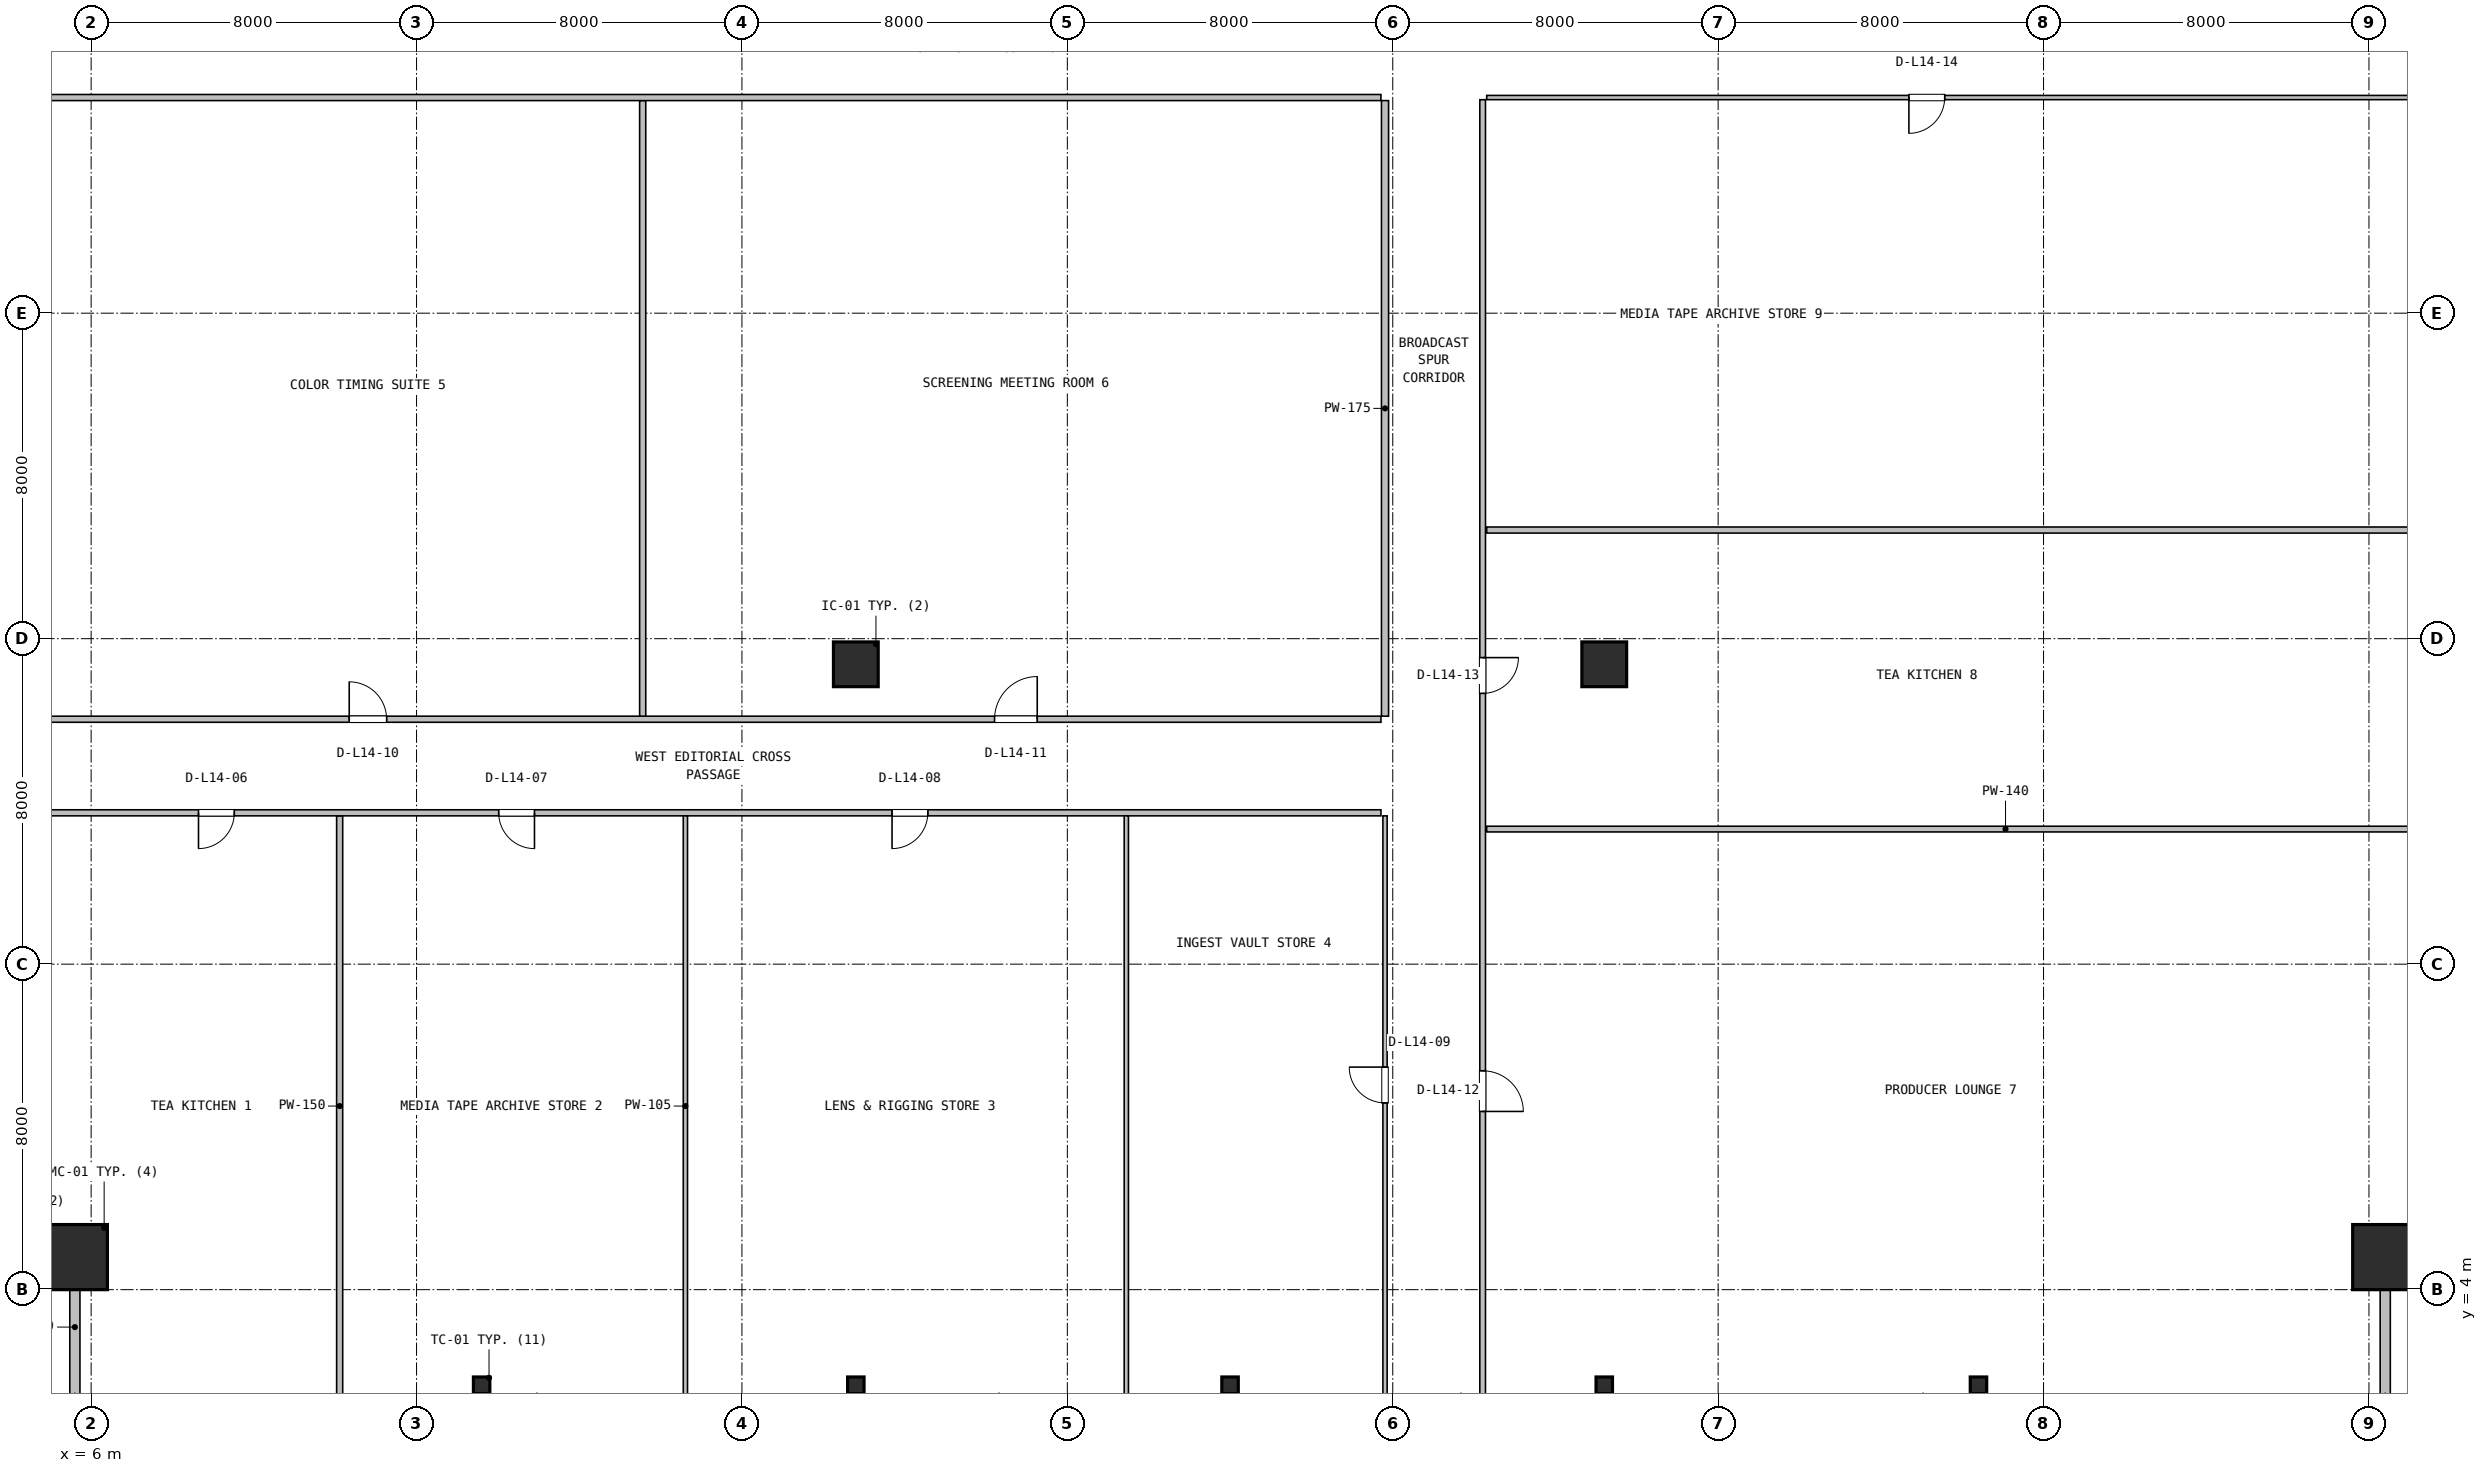
"""IFC4 building model, lengths in metres.
Left out: names, types, materials, properties, quantities, classifications, styles, units other than length and angle.
Written with IfcOpenShell. Run it as: python <this file> out.ifc"""

import sys

from ifc_helpers import new_model, si_unit, direction, frame, frame_2d, origin, origin_2d, place, context, subcontext, project, spatial, rectangle, hollow_rectangle, i_section, extrude, source, transform, mapped, element, fill, save


model = new_model("IFC4")
c1 = context("Model", 3, precision=1e-05, world=origin(), true_north=direction((0.0, 1.0)))
c2 = subcontext(c1, "Body", "Model", "MODEL_VIEW")
j1 = project(units=[si_unit("LENGTHUNIT", "METRE"), si_unit("PLANEANGLEUNIT", "RADIAN")], contexts=[c1])
p1 = place(None, origin())
s1 = spatial("IfcSite", under=j1, at=p1, CompositionType="ELEMENT")
p2 = place(p1, origin())
s2 = spatial("IfcBuilding", under=s1, at=p2, CompositionType="ELEMENT")
p3 = place(p2, frame((0.0, 0.0, 62.7)))
s3 = spatial("IfcBuildingStorey", under=s2, at=p3, CompositionType="ELEMENT", Elevation=62.7)
m1 = source(origin(), c2, "Body", "SweptSolid", [
    extrude(hollow_rectangle(XDim=1.6, YDim=1.6, WallThickness=0.06, at=origin_2d()), origin(), (0.0, 0.0, 1.0), 3.9),
])
for number, where, z_axis, x_axis in (
    (1, (5.6, 4.8, 0.0), (0.0, 0.0, 1.0), (1.0, 0.0, 0.0)),
    (2, (62.4, 4.8, 0.0), (0.0, 0.0, 1.0), (1.0, 0.0, 0.0)),
):
    element("IfcColumn", number, at=place(p3, frame(where, z_axis=z_axis, x_axis=x_axis)), inside=s3, PredefinedType="COLUMN", context=c2, shape_type="MappedRepresentation", body=[
        mapped(m1, transform((0.0, 0.0, 0.0), x_axis=(1.0, 0.0, 0.0), y_axis=(0.0, 1.0, 0.0), z_axis=(0.0, 0.0, 1.0), scale=1.0)),
    ])
m2 = source(origin(), c2, "Body", "SweptSolid", [
    extrude(i_section(OverallWidth=0.404, OverallDepth=0.407, WebThickness=0.027, FlangeThickness=0.044, FilletRadius=0.018, at=origin_2d()), origin(), (0.0, 0.0, 1.0), 3.9),
])
for number, where, z_axis, x_axis in (
    (3, (15.6, 1.65, 0.0), (0.0, 0.0, 1.0), (1.0, 0.0, 0.0)),
    (4, (24.8, 1.65, 0.0), (0.0, 0.0, 1.0), (1.0, 0.0, 0.0)),
    (5, (34.0, 1.65, 0.0), (0.0, 0.0, 1.0), (1.0, 0.0, 0.0)),
    (6, (43.2, 1.65, 0.0), (0.0, 0.0, 1.0), (1.0, 0.0, 0.0)),
    (7, (52.4, 1.65, 0.0), (0.0, 0.0, 1.0), (1.0, 0.0, 0.0)),
):
    element("IfcColumn", number, at=place(p3, frame(where, z_axis=z_axis, x_axis=x_axis)), inside=s3, PredefinedType="COLUMN", context=c2, shape_type="MappedRepresentation", body=[
        mapped(m2, transform((0.0, 0.0, 0.0), x_axis=(1.0, 0.0, 0.0), y_axis=(0.0, 1.0, 0.0), z_axis=(0.0, 0.0, 1.0), scale=1.0)),
    ])
m3 = source(origin(), c2, "Body", "SweptSolid", [
    extrude(rectangle(XDim=1.1, YDim=1.1, at=origin_2d()), origin(), (0.0, 0.0, 1.0), 3.9),
])
for number, where, z_axis, x_axis in (
    (8, (24.8, 19.37, 0.0), (0.0, 0.0, 1.0), (1.0, 0.0, 0.0)),
    (9, (43.2, 19.37, 0.0), (0.0, 0.0, 1.0), (1.0, 0.0, 0.0)),
):
    element("IfcColumn", number, at=place(p3, frame(where, z_axis=z_axis, x_axis=x_axis)), inside=s3, PredefinedType="COLUMN", context=c2, shape_type="MappedRepresentation", body=[
        mapped(m3, transform((0.0, 0.0, 0.0), x_axis=(1.0, 0.0, 0.0), y_axis=(0.0, 1.0, 0.0), z_axis=(0.0, 0.0, 1.0), scale=1.0)),
    ])
for number, where, z_axis, x_axis in (
    (10, (5.6, 1.28, 0.0), (0.0, 0.0, 1.0), (0.0, 1.0, 0.0)),
    (11, (62.4, 1.28, 0.0), (0.0, 0.0, 1.0), (0.0, 1.0, 0.0)),
):
    element("IfcWall", number, at=place(p3, frame(where, z_axis=z_axis, x_axis=x_axis)), inside=s3, PredefinedType="SOLIDWALL", context=c2, shape_type="SweptSolid", body=[
        extrude(rectangle(XDim=3.6, YDim=0.25, at=frame_2d((1.8, 0.0))), origin(), (0.0, 0.0, 1.0), 3.208),
    ])
p4 = place(p3, frame((12.11, 1.38, 0.0), z_axis=(0.0, 0.0, 1.0), x_axis=(0.0, 1.0, 0.0)))
e12 = element("IfcWall", 12, at=p4, inside=s3, PredefinedType="PARTITIONING", context=c2, shape_type="SweptSolid", body=[
    extrude(rectangle(XDim=14.265, YDim=0.15, at=frame_2d((7.133, 0.0))), origin(), (0.0, 0.0, 1.0), 3.208),
])
p5 = place(p3, frame((2.18, 15.72, 0.0), z_axis=(0.0, 0.0, 1.0), x_axis=(1.0, 0.0, 0.0)))
e13 = element("IfcWall", 13, at=p5, inside=s3, PredefinedType="PARTITIONING", context=c2, shape_type="SweptSolid", body=[
    extrude(rectangle(XDim=35.53, YDim=0.15, at=frame_2d((17.765, 0.0))), origin(), (0.0, 0.0, 1.0), 2.852),
])
p6 = place(p5, frame((6.46, 0.0, 0.0)))
e14 = element("IfcOpeningElement", 14, at=p6, cuts=e13, PredefinedType="OPENING", context=c2, shape_type="SweptSolid", body=[
    extrude(rectangle(XDim=0.88, YDim=2.06, at=frame_2d((0.44, 1.03))), frame((0.0, 0.085, 0.0), z_axis=(0.0, -1.0, 0.0), x_axis=(1.0, 0.0, 0.0)), (0.0, 0.0, 1.0), 0.17),
])
p7 = place(p5, frame((13.84, 0.0, 0.0)))
e15 = element("IfcOpeningElement", 15, at=p7, cuts=e13, PredefinedType="OPENING", context=c2, shape_type="SweptSolid", body=[
    extrude(rectangle(XDim=0.88, YDim=2.06, at=frame_2d((0.44, 1.03))), frame((0.0, 0.085, 0.0), z_axis=(0.0, -1.0, 0.0), x_axis=(1.0, 0.0, 0.0)), (0.0, 0.0, 1.0), 0.17),
])
p8 = place(p5, frame((23.51, 0.0, 0.0)))
e16 = element("IfcOpeningElement", 16, at=p8, cuts=e13, PredefinedType="OPENING", context=c2, shape_type="SweptSolid", body=[
    extrude(rectangle(XDim=0.88, YDim=2.06, at=frame_2d((0.44, 1.03))), frame((0.0, 0.085, 0.0), z_axis=(0.0, -1.0, 0.0), x_axis=(1.0, 0.0, 0.0)), (0.0, 0.0, 1.0), 0.17),
])
for number, where, z_axis, x_axis in (
    (17, (20.61, 1.38, 0.0), (0.0, 0.0, 1.0), (0.0, 1.0, 0.0)),
    (18, (31.45, 1.38, 0.0), (0.0, 0.0, 1.0), (0.0, 1.0, 0.0)),
):
    element("IfcWall", number, at=place(p3, frame(where, z_axis=z_axis, x_axis=x_axis)), inside=s3, PredefinedType="PARTITIONING", context=c2, shape_type="SweptSolid", body=[
        extrude(rectangle(XDim=14.265, YDim=0.105, at=frame_2d((7.133, 0.0))), origin(), (0.0, 0.0, 1.0), 3.208),
    ])
p9 = place(p3, frame((37.81, 1.38, 0.0), z_axis=(0.0, 0.0, 1.0), x_axis=(0.0, 1.0, 0.0)))
e19 = element("IfcWall", 19, at=p9, inside=s3, PredefinedType="PARTITIONING", context=c2, shape_type="SweptSolid", body=[
    extrude(rectangle(XDim=14.265, YDim=0.105, at=frame_2d((7.133, 0.0))), origin(), (0.0, 0.0, 1.0), 3.208),
])
p10 = place(p9, frame((7.21, 0.0, 0.0)))
e20 = element("IfcOpeningElement", 20, at=p10, cuts=e19, PredefinedType="OPENING", context=c2, shape_type="SweptSolid", body=[
    extrude(rectangle(XDim=0.88, YDim=2.06, at=frame_2d((0.44, 1.03))), frame((0.0, 0.062, 0.0), z_axis=(0.0, -1.0, 0.0), x_axis=(1.0, 0.0, 0.0)), (0.0, 0.0, 1.0), 0.125),
])
p11 = place(p3, frame((2.18, 18.02, 0.0), z_axis=(0.0, 0.0, 1.0), x_axis=(1.0, 0.0, 0.0)))
e21 = element("IfcWall", 21, at=p11, inside=s3, PredefinedType="PARTITIONING", context=c2, shape_type="SweptSolid", body=[
    extrude(rectangle(XDim=35.53, YDim=0.15, at=frame_2d((17.765, 0.0))), origin(), (0.0, 0.0, 1.0), 2.852),
])
p12 = place(p11, frame((10.165, 0.0, 0.0)))
e22 = element("IfcOpeningElement", 22, at=p12, cuts=e21, PredefinedType="OPENING", context=c2, shape_type="SweptSolid", body=[
    extrude(rectangle(XDim=0.92, YDim=2.08, at=frame_2d((0.46, 1.04))), frame((0.0, 0.085, 0.0), z_axis=(0.0, -1.0, 0.0), x_axis=(1.0, 0.0, 0.0)), (0.0, 0.0, 1.0), 0.17),
])
p13 = place(p11, frame((26.03, 0.0, 0.0)))
e23 = element("IfcOpeningElement", 23, at=p13, cuts=e21, PredefinedType="OPENING", context=c2, shape_type="SweptSolid", body=[
    extrude(rectangle(XDim=1.05, YDim=2.1, at=frame_2d((0.525, 1.05))), frame((0.0, 0.085, 0.0), z_axis=(0.0, -1.0, 0.0), x_axis=(1.0, 0.0, 0.0)), (0.0, 0.0, 1.0), 0.17),
])
p14 = place(p3, frame((19.56, 18.095, 0.0), z_axis=(0.0, 0.0, 1.0), x_axis=(0.0, 1.0, 0.0)))
e24 = element("IfcWall", 24, at=p14, inside=s3, PredefinedType="PARTITIONING", context=c2, shape_type="SweptSolid", body=[
    extrude(rectangle(XDim=15.13, YDim=0.15, at=frame_2d((7.565, 0.0))), origin(), (0.0, 0.0, 1.0), 3.322),
])
p15 = place(p3, frame((2.18, 33.3, 0.0), z_axis=(0.0, 0.0, 1.0), x_axis=(1.0, 0.0, 0.0)))
e25 = element("IfcWall", 25, at=p15, inside=s3, PredefinedType="PARTITIONING", context=c2, shape_type="SweptSolid", body=[
    extrude(rectangle(XDim=35.53, YDim=0.15, at=frame_2d((17.765, 0.0))), origin(), (0.0, 0.0, 1.0), 2.852),
])
p16 = place(p3, frame((37.81, 18.095, 0.0), z_axis=(0.0, 0.0, 1.0), x_axis=(0.0, 1.0, 0.0)))
e26 = element("IfcWall", 26, at=p16, inside=s3, PredefinedType="PARTITIONING", context=c2, shape_type="SweptSolid", body=[
    extrude(rectangle(XDim=15.13, YDim=0.175, at=frame_2d((7.565, 0.0))), origin(), (0.0, 0.0, 1.0), 2.852),
])
p17 = place(p3, frame((40.31, 15.32, 0.0), z_axis=(0.0, 0.0, 1.0), x_axis=(1.0, 0.0, 0.0)))
e27 = element("IfcWall", 27, at=p17, inside=s3, PredefinedType="PARTITIONING", context=c2, shape_type="SweptSolid", body=[
    extrude(rectangle(XDim=25.51, YDim=0.14, at=frame_2d((12.755, 0.0))), origin(), (0.0, 0.0, 1.0), 2.852),
])
p18 = place(p3, frame((40.21, 1.38, 0.0), z_axis=(0.0, 0.0, 1.0), x_axis=(0.0, 1.0, 0.0)))
e28 = element("IfcWall", 28, at=p18, inside=s3, PredefinedType="PARTITIONING", context=c2, shape_type="SweptSolid", body=[
    extrude(rectangle(XDim=31.867, YDim=0.14, at=frame_2d((15.934, 0.0))), origin(), (0.0, 0.0, 1.0), 2.852),
])
p19 = place(p18, frame((7.0, 0.0, 0.0)))
e29 = element("IfcOpeningElement", 29, at=p19, cuts=e28, PredefinedType="OPENING", context=c2, shape_type="SweptSolid", body=[
    extrude(rectangle(XDim=1.0, YDim=2.1, at=frame_2d((0.5, 1.05))), frame((0.0, 0.08, 0.0), z_axis=(0.0, -1.0, 0.0), x_axis=(1.0, 0.0, 0.0)), (0.0, 0.0, 1.0), 0.16),
])
p20 = place(p18, frame((17.275, 0.0, 0.0)))
e30 = element("IfcOpeningElement", 30, at=p20, cuts=e28, PredefinedType="OPENING", context=c2, shape_type="SweptSolid", body=[
    extrude(rectangle(XDim=0.88, YDim=2.06, at=frame_2d((0.44, 1.03))), frame((0.0, 0.08, 0.0), z_axis=(0.0, -1.0, 0.0), x_axis=(1.0, 0.0, 0.0)), (0.0, 0.0, 1.0), 0.16),
])
p21 = place(p3, frame((40.31, 22.67, 0.0), z_axis=(0.0, 0.0, 1.0), x_axis=(1.0, 0.0, 0.0)))
e31 = element("IfcWall", 31, at=p21, inside=s3, PredefinedType="PARTITIONING", context=c2, shape_type="SweptSolid", body=[
    extrude(rectangle(XDim=25.51, YDim=0.15, at=frame_2d((12.755, 0.0))), origin(), (0.0, 0.0, 1.0), 2.852),
])
p22 = place(p3, frame((40.31, 33.3, 0.0), z_axis=(0.0, 0.0, 1.0), x_axis=(1.0, 0.0, 0.0)))
e32 = element("IfcWall", 32, at=p22, inside=s3, PredefinedType="PARTITIONING", context=c2, shape_type="SweptSolid", body=[
    extrude(rectangle(XDim=25.51, YDim=0.105, at=frame_2d((12.755, 0.0))), origin(), (0.0, 0.0, 1.0), 2.852),
])
p23 = place(p22, frame((10.38, 0.0, 0.0)))
e33 = element("IfcOpeningElement", 33, at=p23, cuts=e32, PredefinedType="OPENING", context=c2, shape_type="SweptSolid", body=[
    extrude(rectangle(XDim=0.88, YDim=2.06, at=frame_2d((0.44, 1.03))), frame((0.0, 0.062, 0.0), z_axis=(0.0, -1.0, 0.0), x_axis=(1.0, 0.0, 0.0)), (0.0, 0.0, 1.0), 0.125),
])
m4 = source(origin(), c2, "Body", "SweptSolid", [
    extrude(rectangle(XDim=0.88, YDim=2.06, at=frame_2d((0.44, 1.03))), frame((0.0, 0.025, 0.0), z_axis=(0.0, -1.0, 0.0), x_axis=(1.0, 0.0, 0.0)), (0.0, 0.0, 1.0), 0.05),
])
p24 = place(p6, frame((0.88, 0.0, 0.0), z_axis=(0.0, 0.0, 1.0), x_axis=(-1.0, 0.0, 0.0)))
e34 = element("IfcDoor", 34, at=p24, inside=s3, OperationType="SINGLE_SWING_LEFT", PredefinedType="DOOR", context=c2, shape_type="MappedRepresentation", body=[
    mapped(m4, transform((0.0, 0.0, 0.0), x_axis=(1.0, 0.0, 0.0), y_axis=(0.0, 1.0, 0.0), z_axis=(0.0, 0.0, 1.0), scale=1.0)),
])
fill(e14, e34)
p25 = place(p7, frame((0.88, 0.0, 0.0), z_axis=(0.0, 0.0, 1.0), x_axis=(-1.0, 0.0, 0.0)))
e35 = element("IfcDoor", 35, at=p25, inside=s3, OperationType="SINGLE_SWING_RIGHT", PredefinedType="DOOR", context=c2, shape_type="MappedRepresentation", body=[
    mapped(m4, transform((0.0, 0.0, 0.0), x_axis=(1.0, 0.0, 0.0), y_axis=(0.0, 1.0, 0.0), z_axis=(0.0, 0.0, 1.0), scale=1.0)),
])
fill(e15, e35)
p26 = place(p8, frame((0.88, 0.0, 0.0), z_axis=(0.0, 0.0, 1.0), x_axis=(-1.0, 0.0, 0.0)))
e36 = element("IfcDoor", 36, at=p26, inside=s3, OperationType="SINGLE_SWING_LEFT", PredefinedType="DOOR", context=c2, shape_type="MappedRepresentation", body=[
    mapped(m4, transform((0.0, 0.0, 0.0), x_axis=(1.0, 0.0, 0.0), y_axis=(0.0, 1.0, 0.0), z_axis=(0.0, 0.0, 1.0), scale=1.0)),
])
fill(e16, e36)
p27 = place(p10, origin())
e37 = element("IfcDoor", 37, at=p27, inside=s3, OperationType="SINGLE_SWING_RIGHT", PredefinedType="DOOR", context=c2, shape_type="MappedRepresentation", body=[
    mapped(m4, transform((0.0, 0.0, 0.0), x_axis=(1.0, 0.0, 0.0), y_axis=(0.0, 1.0, 0.0), z_axis=(0.0, 0.0, 1.0), scale=1.0)),
])
fill(e20, e37)
m5 = source(origin(), c2, "Body", "SweptSolid", [
    extrude(rectangle(XDim=0.92, YDim=2.08, at=frame_2d((0.46, 1.04))), frame((0.0, 0.025, 0.0), z_axis=(0.0, -1.0, 0.0), x_axis=(1.0, 0.0, 0.0)), (0.0, 0.0, 1.0), 0.05),
])
p28 = place(p12, origin())
e38 = element("IfcDoor", 38, at=p28, inside=s3, OperationType="SINGLE_SWING_LEFT", PredefinedType="DOOR", context=c2, shape_type="MappedRepresentation", body=[
    mapped(m5, transform((0.0, 0.0, 0.0), x_axis=(1.0, 0.0, 0.0), y_axis=(0.0, 1.0, 0.0), z_axis=(0.0, 0.0, 1.0), scale=1.0)),
])
fill(e22, e38)
m6 = source(origin(), c2, "Body", "SweptSolid", [
    extrude(rectangle(XDim=1.05, YDim=2.1, at=frame_2d((0.525, 1.05))), frame((0.0, 0.025, 0.0), z_axis=(0.0, -1.0, 0.0), x_axis=(1.0, 0.0, 0.0)), (0.0, 0.0, 1.0), 0.05),
])
p29 = place(p13, origin())
e39 = element("IfcDoor", 39, at=p29, inside=s3, OperationType="SINGLE_SWING_RIGHT", PredefinedType="DOOR", context=c2, shape_type="MappedRepresentation", body=[
    mapped(m6, transform((0.0, 0.0, 0.0), x_axis=(1.0, 0.0, 0.0), y_axis=(0.0, 1.0, 0.0), z_axis=(0.0, 0.0, 1.0), scale=1.0)),
])
fill(e23, e39)
m7 = source(origin(), c2, "Body", "SweptSolid", [
    extrude(rectangle(XDim=1.0, YDim=2.1, at=frame_2d((0.5, 1.05))), frame((0.0, 0.025, 0.0), z_axis=(0.0, -1.0, 0.0), x_axis=(1.0, 0.0, 0.0)), (0.0, 0.0, 1.0), 0.05),
])
p30 = place(p19, frame((1.0, 0.0, 0.0), z_axis=(0.0, 0.0, 1.0), x_axis=(-1.0, 0.0, 0.0)))
e40 = element("IfcDoor", 40, at=p30, inside=s3, OperationType="SINGLE_SWING_LEFT", PredefinedType="DOOR", context=c2, shape_type="MappedRepresentation", body=[
    mapped(m7, transform((0.0, 0.0, 0.0), x_axis=(1.0, 0.0, 0.0), y_axis=(0.0, 1.0, 0.0), z_axis=(0.0, 0.0, 1.0), scale=1.0)),
])
fill(e29, e40)
p31 = place(p20, frame((0.88, 0.0, 0.0), z_axis=(0.0, 0.0, 1.0), x_axis=(-1.0, 0.0, 0.0)))
e41 = element("IfcDoor", 41, at=p31, inside=s3, OperationType="SINGLE_SWING_RIGHT", PredefinedType="DOOR", context=c2, shape_type="MappedRepresentation", body=[
    mapped(m4, transform((0.0, 0.0, 0.0), x_axis=(1.0, 0.0, 0.0), y_axis=(0.0, 1.0, 0.0), z_axis=(0.0, 0.0, 1.0), scale=1.0)),
])
fill(e30, e41)
p32 = place(p23, frame((0.88, 0.0, 0.0), z_axis=(0.0, 0.0, 1.0), x_axis=(-1.0, 0.0, 0.0)))
e42 = element("IfcDoor", 42, at=p32, inside=s3, OperationType="SINGLE_SWING_LEFT", PredefinedType="DOOR", context=c2, shape_type="MappedRepresentation", body=[
    mapped(m4, transform((0.0, 0.0, 0.0), x_axis=(1.0, 0.0, 0.0), y_axis=(0.0, 1.0, 0.0), z_axis=(0.0, 0.0, 1.0), scale=1.0)),
])
fill(e33, e42)
save(model, sys.argv[1])
